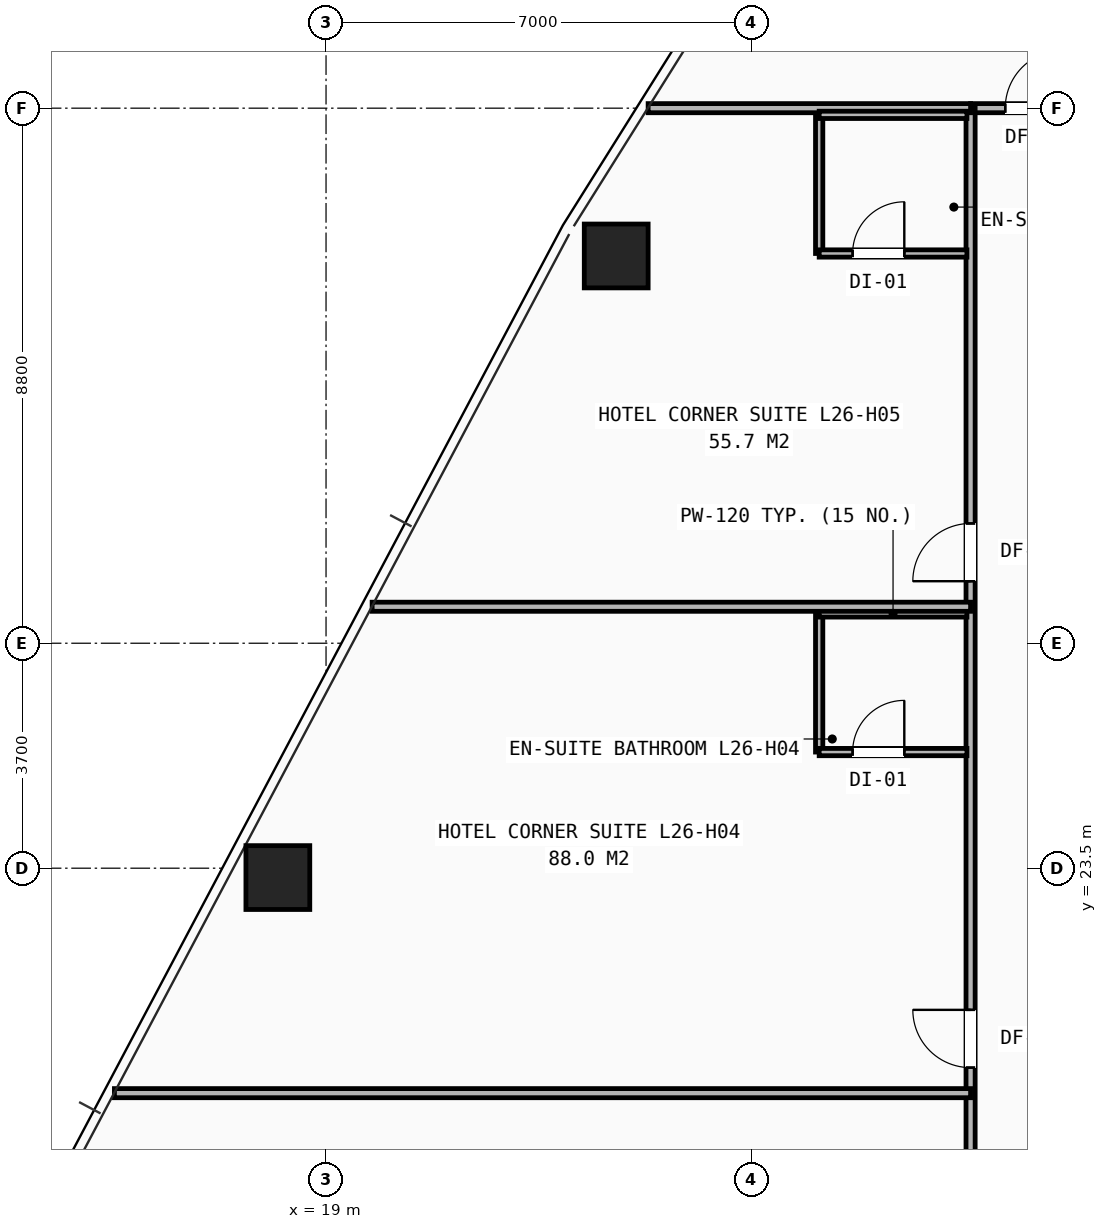
"""IFC4 building model, lengths in metres.
Left out: names, types, materials, properties, quantities, classifications, styles, units other than length and angle.
Written with IfcOpenShell. Run it as: python <this file> out.ifc"""

import sys

from ifc_helpers import new_model, si_unit, direction, frame, frame_2d, origin, origin_2d, place, context, subcontext, project, spatial, rectangle, hollow_rectangle, extrude, element, fill, save


model = new_model("IFC4")
c1 = context("Model", 3, precision=1e-05, world=origin(), true_north=direction((0.0, 1.0)))
c2 = subcontext(c1, "Body", "Model", "MODEL_VIEW")
j1 = project(units=[si_unit("LENGTHUNIT", "METRE"), si_unit("PLANEANGLEUNIT", "RADIAN")], contexts=[c1])
p1 = place(None, origin())
s1 = spatial("IfcSite", under=j1, at=p1, CompositionType="ELEMENT")
p2 = place(p1, origin())
s2 = spatial("IfcBuilding", under=s1, at=p2, CompositionType="ELEMENT")
p3 = place(p2, frame((0.0, 0.0, 92.6)))
s3 = spatial("IfcBuildingStorey", under=s2, at=p3, CompositionType="ELEMENT", Elevation=92.6)
for number, where, z_axis, x_axis in (
    (1, (23.772, 33.569, 0.0), (0.0, 0.0, 1.0), (1.0, 0.0, 0.0)),
    (2, (18.208, 23.346, 0.0), (0.0, 0.0, 1.0), (1.0, 0.0, 0.0)),
):
    element("IfcColumn", number, at=place(p3, frame(where, z_axis=z_axis, x_axis=x_axis)), inside=s3, PredefinedType="COLUMN", context=c2, shape_type="SweptSolid", body=[
        extrude(hollow_rectangle(XDim=1.05, YDim=1.05, WallThickness=0.07, at=origin_2d()), origin(), (0.0, 0.0, 1.0), 3.2),
    ])
p4 = place(p3, frame((29.6, 36.0, 0.0), z_axis=(0.0, 0.0, 1.0), x_axis=(1.0, 0.0, 0.0)))
e3 = element("IfcWall", 3, at=p4, inside=s3, PredefinedType="PARTITIONING", context=c2, shape_type="SweptSolid", body=[
    extrude(rectangle(XDim=9.65, YDim=0.15, at=frame_2d((4.825, 0.0))), origin(), (0.0, 0.0, 1.0), 2.503),
])
p5 = place(p4, frame((0.57, 0.0, 0.0)))
e4 = element("IfcOpeningElement", 4, at=p5, cuts=e3, PredefinedType="OPENING", context=c2, shape_type="SweptSolid", body=[
    extrude(rectangle(XDim=0.95, YDim=2.1, at=frame_2d((0.475, 1.05))), frame((0.0, 0.085, 0.0), z_axis=(0.0, -1.0, 0.0), x_axis=(1.0, 0.0, 0.0)), (0.0, 0.0, 1.0), 0.17),
])
p6 = place(p4, frame((8.02, 0.0, 0.0)))
e5 = element("IfcOpeningElement", 5, at=p6, cuts=e3, PredefinedType="OPENING", context=c2, shape_type="SweptSolid", body=[
    extrude(rectangle(XDim=0.95, YDim=2.1, at=frame_2d((0.475, 1.05))), frame((0.0, 0.085, 0.0), z_axis=(0.0, -1.0, 0.0), x_axis=(1.0, 0.0, 0.0)), (0.0, 0.0, 1.0), 0.17),
])
p7 = place(p3, frame((29.6, 14.1, 0.0), z_axis=(0.0, 0.0, 1.0), x_axis=(0.0, 1.0, 0.0)))
e6 = element("IfcWall", 6, at=p7, inside=s3, PredefinedType="PARTITIONING", context=c2, shape_type="SweptSolid", body=[
    extrude(rectangle(XDim=21.9, YDim=0.15, at=frame_2d((10.95, 0.0))), origin(), (0.0, 0.0, 1.0), 2.421),
])
p8 = place(p7, frame((0.42, 0.0, 0.0)))
e7 = element("IfcOpeningElement", 7, at=p8, cuts=e6, PredefinedType="OPENING", context=c2, shape_type="SweptSolid", body=[
    extrude(rectangle(XDim=0.95, YDim=2.1, at=frame_2d((0.475, 1.05))), frame((0.0, 0.085, 0.0), z_axis=(0.0, -1.0, 0.0), x_axis=(1.0, 0.0, 0.0)), (0.0, 0.0, 1.0), 0.17),
])
p9 = place(p7, frame((6.12, 0.0, 0.0)))
e8 = element("IfcOpeningElement", 8, at=p9, cuts=e6, PredefinedType="OPENING", context=c2, shape_type="SweptSolid", body=[
    extrude(rectangle(XDim=0.95, YDim=2.1, at=frame_2d((0.475, 1.05))), frame((0.0, 0.085, 0.0), z_axis=(0.0, -1.0, 0.0), x_axis=(1.0, 0.0, 0.0)), (0.0, 0.0, 1.0), 0.17),
])
p10 = place(p7, frame((14.12, 0.0, 0.0)))
e9 = element("IfcOpeningElement", 9, at=p10, cuts=e6, PredefinedType="OPENING", context=c2, shape_type="SweptSolid", body=[
    extrude(rectangle(XDim=0.95, YDim=2.1, at=frame_2d((0.475, 1.05))), frame((0.0, 0.085, 0.0), z_axis=(0.0, -1.0, 0.0), x_axis=(1.0, 0.0, 0.0)), (0.0, 0.0, 1.0), 0.17),
])
p11 = place(p3, frame((24.297, 36.0, 0.0), z_axis=(0.0, 0.0, 1.0), x_axis=(1.0, 0.0, 0.0)))
e10 = element("IfcWall", 10, at=p11, inside=s3, PredefinedType="PARTITIONING", context=c2, shape_type="SweptSolid", body=[
    extrude(rectangle(XDim=5.303, YDim=0.15, at=frame_2d((2.651, 0.0))), origin(), (0.0, 0.0, 1.0), 2.258),
])
p12 = place(p3, frame((15.52, 19.8, 0.0), z_axis=(0.0, 0.0, 1.0), x_axis=(1.0, 0.0, 0.0)))
e11 = element("IfcWall", 11, at=p12, inside=s3, PredefinedType="PARTITIONING", context=c2, shape_type="SweptSolid", body=[
    extrude(rectangle(XDim=14.08, YDim=0.15, at=frame_2d((7.04, 0.0))), origin(), (0.0, 0.0, 1.0), 2.258),
])
p13 = place(p3, frame((27.11, 25.41, 0.0), z_axis=(0.0, 0.0, 1.0), x_axis=(0.0, 1.0, 0.0)))
e12 = element("IfcWall", 12, at=p13, inside=s3, PredefinedType="PARTITIONING", context=c2, shape_type="SweptSolid", body=[
    extrude(rectangle(XDim=2.28, YDim=0.12, at=frame_2d((1.14, 0.0))), origin(), (0.0, 0.0, 1.0), 2.97),
])
p14 = place(p3, frame((27.11, 25.41, 0.0), z_axis=(0.0, 0.0, 1.0), x_axis=(1.0, 0.0, 0.0)))
e13 = element("IfcWall", 13, at=p14, inside=s3, PredefinedType="PARTITIONING", context=c2, shape_type="SweptSolid", body=[
    extrude(rectangle(XDim=2.43, YDim=0.12, at=frame_2d((1.215, 0.0))), origin(), (0.0, 0.0, 1.0), 2.97),
])
p15 = place(p14, frame((0.55, 0.0, 0.0)))
e14 = element("IfcOpeningElement", 14, at=p15, cuts=e13, PredefinedType="OPENING", context=c2, shape_type="SweptSolid", body=[
    extrude(rectangle(XDim=0.85, YDim=2.05, at=frame_2d((0.425, 1.025))), frame((0.0, 0.07, 0.0), z_axis=(0.0, -1.0, 0.0), x_axis=(1.0, 0.0, 0.0)), (0.0, 0.0, 1.0), 0.14),
])
p16 = place(p3, frame((27.11, 27.69, 0.0), z_axis=(0.0, 0.0, 1.0), x_axis=(1.0, 0.0, 0.0)))
e15 = element("IfcWall", 15, at=p16, inside=s3, PredefinedType="PARTITIONING", context=c2, shape_type="SweptSolid", body=[
    extrude(rectangle(XDim=2.43, YDim=0.12, at=frame_2d((1.215, 0.0))), origin(), (0.0, 0.0, 1.0), 2.97),
])
p17 = place(p3, frame((19.758, 27.8, 0.0), z_axis=(0.0, 0.0, 1.0), x_axis=(1.0, 0.0, 0.0)))
e16 = element("IfcWall", 16, at=p17, inside=s3, PredefinedType="PARTITIONING", context=c2, shape_type="SweptSolid", body=[
    extrude(rectangle(XDim=9.842, YDim=0.15, at=frame_2d((4.921, 0.0))), origin(), (0.0, 0.0, 1.0), 2.258),
])
p18 = place(p3, frame((27.11, 33.61, 0.0), z_axis=(0.0, 0.0, 1.0), x_axis=(0.0, 1.0, 0.0)))
e17 = element("IfcWall", 17, at=p18, inside=s3, PredefinedType="PARTITIONING", context=c2, shape_type="SweptSolid", body=[
    extrude(rectangle(XDim=2.28, YDim=0.12, at=frame_2d((1.14, 0.0))), origin(), (0.0, 0.0, 1.0), 2.97),
])
p19 = place(p3, frame((27.11, 33.61, 0.0), z_axis=(0.0, 0.0, 1.0), x_axis=(1.0, 0.0, 0.0)))
e18 = element("IfcWall", 18, at=p19, inside=s3, PredefinedType="PARTITIONING", context=c2, shape_type="SweptSolid", body=[
    extrude(rectangle(XDim=2.43, YDim=0.12, at=frame_2d((1.215, 0.0))), origin(), (0.0, 0.0, 1.0), 2.503),
])
p20 = place(p19, frame((0.55, 0.0, 0.0)))
e19 = element("IfcOpeningElement", 19, at=p20, cuts=e18, PredefinedType="OPENING", context=c2, shape_type="SweptSolid", body=[
    extrude(rectangle(XDim=0.85, YDim=2.05, at=frame_2d((0.425, 1.025))), frame((0.0, 0.07, 0.0), z_axis=(0.0, -1.0, 0.0), x_axis=(1.0, 0.0, 0.0)), (0.0, 0.0, 1.0), 0.14),
])
p21 = place(p3, frame((27.11, 35.89, 0.0), z_axis=(0.0, 0.0, 1.0), x_axis=(1.0, 0.0, 0.0)))
e20 = element("IfcWall", 20, at=p21, inside=s3, PredefinedType="PARTITIONING", context=c2, shape_type="SweptSolid", body=[
    extrude(rectangle(XDim=2.43, YDim=0.12, at=frame_2d((1.215, 0.0))), origin(), (0.0, 0.0, 1.0), 2.503),
])
p22 = place(p9, origin())
e21 = element("IfcDoor", 21, at=p22, inside=s3, OperationType="SINGLE_SWING_RIGHT", PredefinedType="DOOR", context=c2, shape_type="SweptSolid", body=[
    extrude(rectangle(XDim=0.95, YDim=2.1, at=frame_2d((0.475, 1.05))), frame((0.0, 0.025, 0.0), z_axis=(0.0, -1.0, 0.0), x_axis=(1.0, 0.0, 0.0)), (0.0, 0.0, 1.0), 0.05),
])
fill(e8, e21)
p23 = place(p15, origin())
e22 = element("IfcDoor", 22, at=p23, inside=s3, OperationType="SINGLE_SWING_RIGHT", PredefinedType="DOOR", context=c2, shape_type="SweptSolid", body=[
    extrude(rectangle(XDim=0.85, YDim=2.05, at=frame_2d((0.425, 1.025))), frame((0.0, 0.025, 0.0), z_axis=(0.0, -1.0, 0.0), x_axis=(1.0, 0.0, 0.0)), (0.0, 0.0, 1.0), 0.05),
])
fill(e14, e22)
p24 = place(p10, origin())
e23 = element("IfcDoor", 23, at=p24, inside=s3, OperationType="SINGLE_SWING_LEFT", PredefinedType="DOOR", context=c2, shape_type="SweptSolid", body=[
    extrude(rectangle(XDim=0.95, YDim=2.1, at=frame_2d((0.475, 1.05))), frame((0.0, 0.025, 0.0), z_axis=(0.0, -1.0, 0.0), x_axis=(1.0, 0.0, 0.0)), (0.0, 0.0, 1.0), 0.05),
])
fill(e9, e23)
p25 = place(p20, origin())
e24 = element("IfcDoor", 24, at=p25, inside=s3, OperationType="SINGLE_SWING_RIGHT", PredefinedType="DOOR", context=c2, shape_type="SweptSolid", body=[
    extrude(rectangle(XDim=0.85, YDim=2.05, at=frame_2d((0.425, 1.025))), frame((0.0, 0.025, 0.0), z_axis=(0.0, -1.0, 0.0), x_axis=(1.0, 0.0, 0.0)), (0.0, 0.0, 1.0), 0.05),
])
fill(e19, e24)
p26 = place(p5, origin())
e25 = element("IfcDoor", 25, at=p26, inside=s3, OperationType="SINGLE_SWING_RIGHT", PredefinedType="DOOR", context=c2, shape_type="SweptSolid", body=[
    extrude(rectangle(XDim=0.95, YDim=2.1, at=frame_2d((0.475, 1.05))), frame((0.0, 0.025, 0.0), z_axis=(0.0, -1.0, 0.0), x_axis=(1.0, 0.0, 0.0)), (0.0, 0.0, 1.0), 0.05),
])
fill(e4, e25)
save(model, sys.argv[1])
